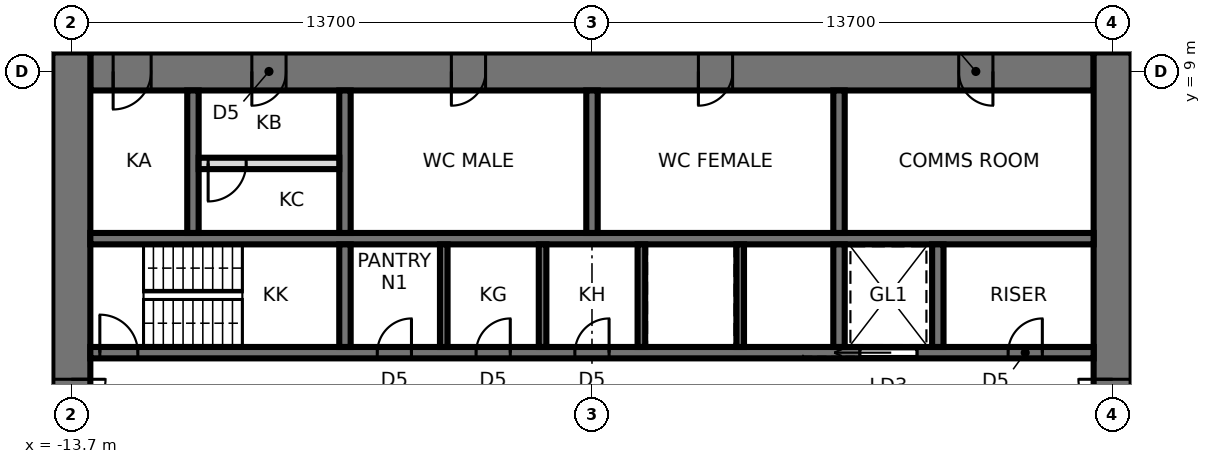
"""IFC4 building model, lengths in metres.
Left out: names, types, materials, properties, quantities, classifications, styles, units other than length and angle.
Written with IfcOpenShell. Run it as: python <this file> out.ifc"""

import sys

from ifc_helpers import new_model, si_unit, direction, frame, frame_2d, origin, place, context, subcontext, project, spatial, rectangle, extrude, element, fill, save


model = new_model("IFC4")
c1 = context("Model", 3, precision=1e-05, world=origin(), true_north=direction((0.0, 1.0)))
c2 = subcontext(c1, "Body", "Model", "MODEL_VIEW")
j1 = project(units=[si_unit("LENGTHUNIT", "METRE"), si_unit("PLANEANGLEUNIT", "RADIAN")], contexts=[c1])
p1 = place(None, origin())
s1 = spatial("IfcSite", under=j1, at=p1, CompositionType="ELEMENT")
p2 = place(p1, origin())
s2 = spatial("IfcBuilding", under=s1, at=p2, CompositionType="ELEMENT")
p3 = place(p2, frame((0.0, 0.0, 115.8)))
s3 = spatial("IfcBuildingStorey", under=s2, at=p3, CompositionType="ELEMENT", Elevation=115.8)
p4 = place(p3, frame((13.2, 9.0, 0.0), z_axis=(0.0, 0.0, 1.0), x_axis=(-1.0, 0.0, 0.0)))
e1 = element("IfcWall", 1, at=p4, inside=s3, PredefinedType="SHEAR", context=c2, shape_type="SweptSolid", body=[
    extrude(rectangle(XDim=26.4, YDim=1.0, at=frame_2d((13.2, 0.0))), origin(), (0.0, 0.0, 1.0), 3.9),
])
p5 = place(p4, frame((2.65, 0.0, 0.0)))
e2 = element("IfcOpeningElement", 2, at=p5, cuts=e1, PredefinedType="OPENING", context=c2, shape_type="SweptSolid", body=[
    extrude(rectangle(XDim=0.9, YDim=2.1, at=frame_2d((0.45, 1.05))), frame((0.0, 0.51, 0.0), z_axis=(0.0, -1.0, 0.0), x_axis=(1.0, 0.0, 0.0)), (0.0, 0.0, 1.0), 1.02),
])
p6 = place(p4, frame((9.5, 0.0, 0.0)))
e3 = element("IfcOpeningElement", 3, at=p6, cuts=e1, PredefinedType="OPENING", context=c2, shape_type="SweptSolid", body=[
    extrude(rectangle(XDim=0.9, YDim=2.1, at=frame_2d((0.45, 1.05))), frame((0.0, 0.51, 0.0), z_axis=(0.0, -1.0, 0.0), x_axis=(1.0, 0.0, 0.0)), (0.0, 0.0, 1.0), 1.02),
])
p7 = place(p4, frame((16.0, 0.0, 0.0)))
e4 = element("IfcOpeningElement", 4, at=p7, cuts=e1, PredefinedType="OPENING", context=c2, shape_type="SweptSolid", body=[
    extrude(rectangle(XDim=0.9, YDim=2.1, at=frame_2d((0.45, 1.05))), frame((0.0, 0.51, 0.0), z_axis=(0.0, -1.0, 0.0), x_axis=(1.0, 0.0, 0.0)), (0.0, 0.0, 1.0), 1.02),
])
p8 = place(p4, frame((21.25, 0.0, 0.0)))
e5 = element("IfcOpeningElement", 5, at=p8, cuts=e1, PredefinedType="OPENING", context=c2, shape_type="SweptSolid", body=[
    extrude(rectangle(XDim=0.9, YDim=2.1, at=frame_2d((0.45, 1.05))), frame((0.0, 0.51, 0.0), z_axis=(0.0, -1.0, 0.0), x_axis=(1.0, 0.0, 0.0)), (0.0, 0.0, 1.0), 1.02),
])
p9 = place(p4, frame((24.8, 0.0, 0.0)))
e6 = element("IfcOpeningElement", 6, at=p9, cuts=e1, PredefinedType="OPENING", context=c2, shape_type="SweptSolid", body=[
    extrude(rectangle(XDim=1.0, YDim=2.1, at=frame_2d((0.5, 1.05))), frame((0.0, 0.51, 0.0), z_axis=(0.0, -1.0, 0.0), x_axis=(1.0, 0.0, 0.0)), (0.0, 0.0, 1.0), 1.02),
])
p10 = place(p3, frame((13.7, -9.5, 0.0), z_axis=(0.0, 0.0, 1.0), x_axis=(0.0, 1.0, 0.0)))
e7 = element("IfcWall", 7, at=p10, inside=s3, PredefinedType="SHEAR", context=c2, shape_type="SweptSolid", body=[
    extrude(rectangle(XDim=19.0, YDim=1.0, at=frame_2d((9.5, 0.0))), origin(), (0.0, 0.0, 1.0), 3.9),
])
p11 = place(p10, frame((8.6, 0.0, 0.0)))
e8 = element("IfcOpeningElement", 8, at=p11, cuts=e7, PredefinedType="OPENING", context=c2, shape_type="SweptSolid", body=[
    extrude(rectangle(XDim=1.8, YDim=2.4, at=frame_2d((0.9, 1.2))), frame((0.0, 0.51, 0.0), z_axis=(0.0, -1.0, 0.0), x_axis=(1.0, 0.0, 0.0)), (0.0, 0.0, 1.0), 1.02),
])
p12 = place(p3, frame((-13.7, 9.5, 0.0), z_axis=(0.0, 0.0, 1.0), x_axis=(0.0, -1.0, 0.0)))
e9 = element("IfcWall", 9, at=p12, inside=s3, PredefinedType="SHEAR", context=c2, shape_type="SweptSolid", body=[
    extrude(rectangle(XDim=19.0, YDim=1.0, at=frame_2d((9.5, 0.0))), origin(), (0.0, 0.0, 1.0), 3.9),
])
p13 = place(p12, frame((8.6, 0.0, 0.0)))
e10 = element("IfcOpeningElement", 10, at=p13, cuts=e9, PredefinedType="OPENING", context=c2, shape_type="SweptSolid", body=[
    extrude(rectangle(XDim=1.8, YDim=2.4, at=frame_2d((0.9, 1.2))), frame((0.0, 0.51, 0.0), z_axis=(0.0, -1.0, 0.0), x_axis=(1.0, 0.0, 0.0)), (0.0, 0.0, 1.0), 1.02),
])
p14 = place(p3, frame((-13.2, 1.6, 0.0), z_axis=(0.0, 0.0, 1.0), x_axis=(1.0, 0.0, 0.0)))
e11 = element("IfcWall", 11, at=p14, inside=s3, PredefinedType="SHEAR", context=c2, shape_type="SweptSolid", body=[
    extrude(rectangle(XDim=26.4, YDim=0.3, at=frame_2d((13.2, 0.0))), origin(), (0.0, 0.0, 1.0), 3.9),
])
p15 = place(p14, frame((0.25, 0.0, 0.0)))
e12 = element("IfcOpeningElement", 12, at=p15, cuts=e11, PredefinedType="OPENING", context=c2, shape_type="SweptSolid", body=[
    extrude(rectangle(XDim=1.0, YDim=2.1, at=frame_2d((0.5, 1.05))), frame((0.0, 0.16, 0.0), z_axis=(0.0, -1.0, 0.0), x_axis=(1.0, 0.0, 0.0)), (0.0, 0.0, 1.0), 0.32),
])
p16 = place(p14, frame((20.25, 0.0, 0.0)))
e13 = element("IfcOpeningElement", 13, at=p16, cuts=e11, PredefinedType="OPENING", context=c2, shape_type="SweptSolid", body=[
    extrude(rectangle(XDim=1.5, YDim=2.4, at=frame_2d((0.75, 1.2))), frame((0.0, 0.16, 0.0), z_axis=(0.0, -1.0, 0.0), x_axis=(1.0, 0.0, 0.0)), (0.0, 0.0, 1.0), 0.32),
])
p17 = place(p14, frame((7.55, 0.0, 0.0)))
e14 = element("IfcOpeningElement", 14, at=p17, cuts=e11, PredefinedType="OPENING", context=c2, shape_type="SweptSolid", body=[
    extrude(rectangle(XDim=0.9, YDim=2.1, at=frame_2d((0.45, 1.05))), frame((0.0, 0.16, 0.0), z_axis=(0.0, -1.0, 0.0), x_axis=(1.0, 0.0, 0.0)), (0.0, 0.0, 1.0), 0.32),
])
p18 = place(p14, frame((10.15, 0.0, 0.0)))
e15 = element("IfcOpeningElement", 15, at=p18, cuts=e11, PredefinedType="OPENING", context=c2, shape_type="SweptSolid", body=[
    extrude(rectangle(XDim=0.9, YDim=2.1, at=frame_2d((0.45, 1.05))), frame((0.0, 0.16, 0.0), z_axis=(0.0, -1.0, 0.0), x_axis=(1.0, 0.0, 0.0)), (0.0, 0.0, 1.0), 0.32),
])
p19 = place(p14, frame((12.75, 0.0, 0.0)))
e16 = element("IfcOpeningElement", 16, at=p19, cuts=e11, PredefinedType="OPENING", context=c2, shape_type="SweptSolid", body=[
    extrude(rectangle(XDim=0.9, YDim=2.1, at=frame_2d((0.45, 1.05))), frame((0.0, 0.16, 0.0), z_axis=(0.0, -1.0, 0.0), x_axis=(1.0, 0.0, 0.0)), (0.0, 0.0, 1.0), 0.32),
])
p20 = place(p14, frame((24.15, 0.0, 0.0)))
e17 = element("IfcOpeningElement", 17, at=p20, cuts=e11, PredefinedType="OPENING", context=c2, shape_type="SweptSolid", body=[
    extrude(rectangle(XDim=0.9, YDim=2.1, at=frame_2d((0.45, 1.05))), frame((0.0, 0.16, 0.0), z_axis=(0.0, -1.0, 0.0), x_axis=(1.0, 0.0, 0.0)), (0.0, 0.0, 1.0), 0.32),
])
p21 = place(p3, frame((-13.2, 4.6, 0.0), z_axis=(0.0, 0.0, 1.0), x_axis=(1.0, 0.0, 0.0)))
e18 = element("IfcWall", 18, at=p21, inside=s3, PredefinedType="SHEAR", context=c2, shape_type="SweptSolid", body=[
    extrude(rectangle(XDim=26.4, YDim=0.3, at=frame_2d((13.2, 0.0))), origin(), (0.0, 0.0, 1.0), 3.9),
])
p22 = place(p3, frame((-6.5, 1.75, 0.0), z_axis=(0.0, 0.0, 1.0), x_axis=(0.0, 1.0, 0.0)))
e19 = element("IfcWall", 19, at=p22, inside=s3, PredefinedType="SHEAR", context=c2, shape_type="SweptSolid", body=[
    extrude(rectangle(XDim=2.7, YDim=0.3, at=frame_2d((1.35, 0.0))), origin(), (0.0, 0.0, 1.0), 3.9),
])
p23 = place(p3, frame((-6.5, 4.75, 0.0), z_axis=(0.0, 0.0, 1.0), x_axis=(0.0, 1.0, 0.0)))
e20 = element("IfcWall", 20, at=p23, inside=s3, PredefinedType="SHEAR", context=c2, shape_type="SweptSolid", body=[
    extrude(rectangle(XDim=3.75, YDim=0.3, at=frame_2d((1.875, 0.0))), origin(), (0.0, 0.0, 1.0), 3.9),
])
p24 = place(p3, frame((6.5, 1.75, 0.0), z_axis=(0.0, 0.0, 1.0), x_axis=(0.0, 1.0, 0.0)))
e21 = element("IfcWall", 21, at=p24, inside=s3, PredefinedType="SHEAR", context=c2, shape_type="SweptSolid", body=[
    extrude(rectangle(XDim=2.7, YDim=0.3, at=frame_2d((1.35, 0.0))), origin(), (0.0, 0.0, 1.0), 3.9),
])
p25 = place(p3, frame((6.5, 4.75, 0.0), z_axis=(0.0, 0.0, 1.0), x_axis=(0.0, 1.0, 0.0)))
e22 = element("IfcWall", 22, at=p25, inside=s3, PredefinedType="SHEAR", context=c2, shape_type="SweptSolid", body=[
    extrude(rectangle(XDim=3.75, YDim=0.3, at=frame_2d((1.875, 0.0))), origin(), (0.0, 0.0, 1.0), 3.9),
])
for number, where, z_axis, x_axis in (
    (23, (-3.9, 1.75, 0.0), (0.0, 0.0, 1.0), (0.0, 1.0, 0.0)),
    (24, (-1.3, 1.75, 0.0), (0.0, 0.0, 1.0), (0.0, 1.0, 0.0)),
    (25, (1.3, 1.75, 0.0), (0.0, 0.0, 1.0), (0.0, 1.0, 0.0)),
    (26, (3.9, 1.75, 0.0), (0.0, 0.0, 1.0), (0.0, 1.0, 0.0)),
):
    element("IfcWall", number, at=place(p3, frame(where, z_axis=z_axis, x_axis=x_axis)), inside=s3, PredefinedType="SHEAR", context=c2, shape_type="SweptSolid", body=[
        extrude(rectangle(XDim=2.7, YDim=0.2, at=frame_2d((1.35, 0.0))), origin(), (0.0, 0.0, 1.0), 3.9),
    ])
for number, where, z_axis, x_axis in (
    (27, (0.0, 4.75, 0.0), (0.0, 0.0, 1.0), (0.0, 1.0, 0.0)),
    (28, (-10.5, 4.75, 0.0), (0.0, 0.0, 1.0), (0.0, 1.0, 0.0)),
):
    element("IfcWall", number, at=place(p3, frame(where, z_axis=z_axis, x_axis=x_axis)), inside=s3, PredefinedType="SHEAR", context=c2, shape_type="SweptSolid", body=[
        extrude(rectangle(XDim=3.75, YDim=0.3, at=frame_2d((1.875, 0.0))), origin(), (0.0, 0.0, 1.0), 3.9),
    ])
p26 = place(p3, frame((9.1, 1.75, 0.0), z_axis=(0.0, 0.0, 1.0), x_axis=(0.0, 1.0, 0.0)))
e29 = element("IfcWall", 29, at=p26, inside=s3, PredefinedType="SHEAR", context=c2, shape_type="SweptSolid", body=[
    extrude(rectangle(XDim=2.7, YDim=0.3, at=frame_2d((1.35, 0.0))), origin(), (0.0, 0.0, 1.0), 3.9),
])
p27 = place(p3, frame((-10.35, 6.58, 0.0), z_axis=(0.0, 0.0, 1.0), x_axis=(1.0, 0.0, 0.0)))
e30 = element("IfcWall", 30, at=p27, inside=s3, PredefinedType="PARTITIONING", context=c2, shape_type="SweptSolid", body=[
    extrude(rectangle(XDim=3.7, YDim=0.3, at=frame_2d((1.85, 0.0))), origin(), (0.0, 0.0, 1.0), 3.74),
])
p28 = place(p27, frame((0.25, 0.0, 0.0)))
e31 = element("IfcOpeningElement", 31, at=p28, cuts=e30, PredefinedType="OPENING", context=c2, shape_type="SweptSolid", body=[
    extrude(rectangle(XDim=1.0, YDim=2.4, at=frame_2d((0.5, 1.2))), frame((0.0, 0.16, 0.0), z_axis=(0.0, -1.0, 0.0), x_axis=(1.0, 0.0, 0.0)), (0.0, 0.0, 1.0), 0.32),
])
p29 = place(p13, origin())
e32 = element("IfcDoor", 32, at=p29, inside=s3, OperationType="DOUBLE_DOOR_SINGLE_SWING", PredefinedType="DOOR", context=c2, shape_type="SweptSolid", body=[
    extrude(rectangle(XDim=1.72, YDim=2.36, at=frame_2d((0.9, 1.18))), frame((0.0, 0.025, 0.0), z_axis=(0.0, -1.0, 0.0), x_axis=(1.0, 0.0, 0.0)), (0.0, 0.0, 1.0), 0.05),
    extrude(rectangle(XDim=0.04, YDim=2.4, at=frame_2d((0.02, 1.2))), frame((0.0, 0.25, 0.0), z_axis=(0.0, -1.0, 0.0), x_axis=(1.0, 0.0, 0.0)), (0.0, 0.0, 1.0), 0.5),
    extrude(rectangle(XDim=0.04, YDim=2.4, at=frame_2d((1.78, 1.2))), frame((0.0, 0.25, 0.0), z_axis=(0.0, -1.0, 0.0), x_axis=(1.0, 0.0, 0.0)), (0.0, 0.0, 1.0), 0.5),
    extrude(rectangle(XDim=1.72, YDim=0.04, at=frame_2d((0.9, 2.38))), frame((0.0, 0.25, 0.0), z_axis=(0.0, -1.0, 0.0), x_axis=(1.0, 0.0, 0.0)), (0.0, 0.0, 1.0), 0.5),
])
fill(e10, e32)
p30 = place(p11, origin())
e33 = element("IfcDoor", 33, at=p30, inside=s3, OperationType="DOUBLE_DOOR_SINGLE_SWING", PredefinedType="DOOR", context=c2, shape_type="SweptSolid", body=[
    extrude(rectangle(XDim=1.72, YDim=2.36, at=frame_2d((0.9, 1.18))), frame((0.0, 0.025, 0.0), z_axis=(0.0, -1.0, 0.0), x_axis=(1.0, 0.0, 0.0)), (0.0, 0.0, 1.0), 0.05),
    extrude(rectangle(XDim=0.04, YDim=2.4, at=frame_2d((0.02, 1.2))), frame((0.0, 0.25, 0.0), z_axis=(0.0, -1.0, 0.0), x_axis=(1.0, 0.0, 0.0)), (0.0, 0.0, 1.0), 0.5),
    extrude(rectangle(XDim=0.04, YDim=2.4, at=frame_2d((1.78, 1.2))), frame((0.0, 0.25, 0.0), z_axis=(0.0, -1.0, 0.0), x_axis=(1.0, 0.0, 0.0)), (0.0, 0.0, 1.0), 0.5),
    extrude(rectangle(XDim=1.72, YDim=0.04, at=frame_2d((0.9, 2.38))), frame((0.0, 0.25, 0.0), z_axis=(0.0, -1.0, 0.0), x_axis=(1.0, 0.0, 0.0)), (0.0, 0.0, 1.0), 0.5),
])
fill(e8, e33)
p31 = place(p15, origin())
e34 = element("IfcDoor", 34, at=p31, inside=s3, OperationType="SINGLE_SWING_LEFT", PredefinedType="DOOR", context=c2, shape_type="SweptSolid", body=[
    extrude(rectangle(XDim=1.0, YDim=2.1, at=frame_2d((0.5, 1.05))), frame((0.0, 0.025, 0.0), z_axis=(0.0, -1.0, 0.0), x_axis=(1.0, 0.0, 0.0)), (0.0, 0.0, 1.0), 0.05),
])
fill(e12, e34)
p32 = place(p16, origin())
e35 = element("IfcDoor", 35, at=p32, inside=s3, OperationType="SLIDING_TO_LEFT", PredefinedType="DOOR", context=c2, shape_type="SweptSolid", body=[
    extrude(rectangle(XDim=1.5, YDim=2.4, at=frame_2d((0.75, 1.2))), frame((0.0, 0.025, 0.0), z_axis=(0.0, -1.0, 0.0), x_axis=(1.0, 0.0, 0.0)), (0.0, 0.0, 1.0), 0.05),
])
fill(e13, e35)
p33 = place(p17, origin())
e36 = element("IfcDoor", 36, at=p33, inside=s3, OperationType="SINGLE_SWING_RIGHT", PredefinedType="DOOR", context=c2, shape_type="SweptSolid", body=[
    extrude(rectangle(XDim=0.9, YDim=2.1, at=frame_2d((0.45, 1.05))), frame((0.0, 0.025, 0.0), z_axis=(0.0, -1.0, 0.0), x_axis=(1.0, 0.0, 0.0)), (0.0, 0.0, 1.0), 0.05),
])
fill(e14, e36)
p34 = place(p18, origin())
e37 = element("IfcDoor", 37, at=p34, inside=s3, OperationType="SINGLE_SWING_RIGHT", PredefinedType="DOOR", context=c2, shape_type="SweptSolid", body=[
    extrude(rectangle(XDim=0.9, YDim=2.1, at=frame_2d((0.45, 1.05))), frame((0.0, 0.025, 0.0), z_axis=(0.0, -1.0, 0.0), x_axis=(1.0, 0.0, 0.0)), (0.0, 0.0, 1.0), 0.05),
])
fill(e15, e37)
p35 = place(p19, origin())
e38 = element("IfcDoor", 38, at=p35, inside=s3, OperationType="SINGLE_SWING_RIGHT", PredefinedType="DOOR", context=c2, shape_type="SweptSolid", body=[
    extrude(rectangle(XDim=0.9, YDim=2.1, at=frame_2d((0.45, 1.05))), frame((0.0, 0.025, 0.0), z_axis=(0.0, -1.0, 0.0), x_axis=(1.0, 0.0, 0.0)), (0.0, 0.0, 1.0), 0.05),
])
fill(e16, e38)
p36 = place(p20, origin())
e39 = element("IfcDoor", 39, at=p36, inside=s3, OperationType="SINGLE_SWING_RIGHT", PredefinedType="DOOR", context=c2, shape_type="SweptSolid", body=[
    extrude(rectangle(XDim=0.9, YDim=2.1, at=frame_2d((0.45, 1.05))), frame((0.0, 0.025, 0.0), z_axis=(0.0, -1.0, 0.0), x_axis=(1.0, 0.0, 0.0)), (0.0, 0.0, 1.0), 0.05),
])
fill(e17, e39)
p37 = place(p5, origin())
e40 = element("IfcDoor", 40, at=p37, inside=s3, OperationType="SINGLE_SWING_LEFT", PredefinedType="DOOR", context=c2, shape_type="SweptSolid", body=[
    extrude(rectangle(XDim=0.82, YDim=2.06, at=frame_2d((0.45, 1.03))), frame((0.0, 0.025, 0.0), z_axis=(0.0, -1.0, 0.0), x_axis=(1.0, 0.0, 0.0)), (0.0, 0.0, 1.0), 0.05),
    extrude(rectangle(XDim=0.04, YDim=2.1, at=frame_2d((0.02, 1.05))), frame((0.0, 0.25, 0.0), z_axis=(0.0, -1.0, 0.0), x_axis=(1.0, 0.0, 0.0)), (0.0, 0.0, 1.0), 0.5),
    extrude(rectangle(XDim=0.04, YDim=2.1, at=frame_2d((0.88, 1.05))), frame((0.0, 0.25, 0.0), z_axis=(0.0, -1.0, 0.0), x_axis=(1.0, 0.0, 0.0)), (0.0, 0.0, 1.0), 0.5),
    extrude(rectangle(XDim=0.82, YDim=0.04, at=frame_2d((0.45, 2.08))), frame((0.0, 0.25, 0.0), z_axis=(0.0, -1.0, 0.0), x_axis=(1.0, 0.0, 0.0)), (0.0, 0.0, 1.0), 0.5),
])
fill(e2, e40)
p38 = place(p6, origin())
e41 = element("IfcDoor", 41, at=p38, inside=s3, OperationType="SINGLE_SWING_RIGHT", PredefinedType="DOOR", context=c2, shape_type="SweptSolid", body=[
    extrude(rectangle(XDim=0.82, YDim=2.06, at=frame_2d((0.45, 1.03))), frame((0.0, 0.025, 0.0), z_axis=(0.0, -1.0, 0.0), x_axis=(1.0, 0.0, 0.0)), (0.0, 0.0, 1.0), 0.05),
    extrude(rectangle(XDim=0.04, YDim=2.1, at=frame_2d((0.02, 1.05))), frame((0.0, 0.25, 0.0), z_axis=(0.0, -1.0, 0.0), x_axis=(1.0, 0.0, 0.0)), (0.0, 0.0, 1.0), 0.5),
    extrude(rectangle(XDim=0.04, YDim=2.1, at=frame_2d((0.88, 1.05))), frame((0.0, 0.25, 0.0), z_axis=(0.0, -1.0, 0.0), x_axis=(1.0, 0.0, 0.0)), (0.0, 0.0, 1.0), 0.5),
    extrude(rectangle(XDim=0.82, YDim=0.04, at=frame_2d((0.45, 2.08))), frame((0.0, 0.25, 0.0), z_axis=(0.0, -1.0, 0.0), x_axis=(1.0, 0.0, 0.0)), (0.0, 0.0, 1.0), 0.5),
])
fill(e3, e41)
p39 = place(p7, origin())
e42 = element("IfcDoor", 42, at=p39, inside=s3, OperationType="SINGLE_SWING_RIGHT", PredefinedType="DOOR", context=c2, shape_type="SweptSolid", body=[
    extrude(rectangle(XDim=0.82, YDim=2.06, at=frame_2d((0.45, 1.03))), frame((0.0, 0.025, 0.0), z_axis=(0.0, -1.0, 0.0), x_axis=(1.0, 0.0, 0.0)), (0.0, 0.0, 1.0), 0.05),
    extrude(rectangle(XDim=0.04, YDim=2.1, at=frame_2d((0.02, 1.05))), frame((0.0, 0.25, 0.0), z_axis=(0.0, -1.0, 0.0), x_axis=(1.0, 0.0, 0.0)), (0.0, 0.0, 1.0), 0.5),
    extrude(rectangle(XDim=0.04, YDim=2.1, at=frame_2d((0.88, 1.05))), frame((0.0, 0.25, 0.0), z_axis=(0.0, -1.0, 0.0), x_axis=(1.0, 0.0, 0.0)), (0.0, 0.0, 1.0), 0.5),
    extrude(rectangle(XDim=0.82, YDim=0.04, at=frame_2d((0.45, 2.08))), frame((0.0, 0.25, 0.0), z_axis=(0.0, -1.0, 0.0), x_axis=(1.0, 0.0, 0.0)), (0.0, 0.0, 1.0), 0.5),
])
fill(e4, e42)
p40 = place(p8, origin())
e43 = element("IfcDoor", 43, at=p40, inside=s3, OperationType="SINGLE_SWING_RIGHT", PredefinedType="DOOR", context=c2, shape_type="SweptSolid", body=[
    extrude(rectangle(XDim=0.82, YDim=2.06, at=frame_2d((0.45, 1.03))), frame((0.0, 0.025, 0.0), z_axis=(0.0, -1.0, 0.0), x_axis=(1.0, 0.0, 0.0)), (0.0, 0.0, 1.0), 0.05),
    extrude(rectangle(XDim=0.04, YDim=2.1, at=frame_2d((0.02, 1.05))), frame((0.0, 0.25, 0.0), z_axis=(0.0, -1.0, 0.0), x_axis=(1.0, 0.0, 0.0)), (0.0, 0.0, 1.0), 0.5),
    extrude(rectangle(XDim=0.04, YDim=2.1, at=frame_2d((0.88, 1.05))), frame((0.0, 0.25, 0.0), z_axis=(0.0, -1.0, 0.0), x_axis=(1.0, 0.0, 0.0)), (0.0, 0.0, 1.0), 0.5),
    extrude(rectangle(XDim=0.82, YDim=0.04, at=frame_2d((0.45, 2.08))), frame((0.0, 0.25, 0.0), z_axis=(0.0, -1.0, 0.0), x_axis=(1.0, 0.0, 0.0)), (0.0, 0.0, 1.0), 0.5),
])
fill(e5, e43)
p41 = place(p9, origin())
e44 = element("IfcDoor", 44, at=p41, inside=s3, OperationType="SINGLE_SWING_RIGHT", PredefinedType="DOOR", context=c2, shape_type="SweptSolid", body=[
    extrude(rectangle(XDim=0.92, YDim=2.06, at=frame_2d((0.5, 1.03))), frame((0.0, 0.025, 0.0), z_axis=(0.0, -1.0, 0.0), x_axis=(1.0, 0.0, 0.0)), (0.0, 0.0, 1.0), 0.05),
    extrude(rectangle(XDim=0.04, YDim=2.1, at=frame_2d((0.02, 1.05))), frame((0.0, 0.25, 0.0), z_axis=(0.0, -1.0, 0.0), x_axis=(1.0, 0.0, 0.0)), (0.0, 0.0, 1.0), 0.5),
    extrude(rectangle(XDim=0.04, YDim=2.1, at=frame_2d((0.98, 1.05))), frame((0.0, 0.25, 0.0), z_axis=(0.0, -1.0, 0.0), x_axis=(1.0, 0.0, 0.0)), (0.0, 0.0, 1.0), 0.5),
    extrude(rectangle(XDim=0.92, YDim=0.04, at=frame_2d((0.5, 2.08))), frame((0.0, 0.25, 0.0), z_axis=(0.0, -1.0, 0.0), x_axis=(1.0, 0.0, 0.0)), (0.0, 0.0, 1.0), 0.5),
])
fill(e6, e44)
p42 = place(p28, frame((1.0, 0.0, 0.0), z_axis=(0.0, 0.0, 1.0), x_axis=(-1.0, 0.0, 0.0)))
e45 = element("IfcDoor", 45, at=p42, inside=s3, OperationType="SINGLE_SWING_RIGHT", PredefinedType="DOOR", context=c2, shape_type="SweptSolid", body=[
    extrude(rectangle(XDim=1.0, YDim=2.4, at=frame_2d((0.5, 1.2))), frame((0.0, 0.025, 0.0), z_axis=(0.0, -1.0, 0.0), x_axis=(1.0, 0.0, 0.0)), (0.0, 0.0, 1.0), 0.05),
])
fill(e31, e45)
save(model, sys.argv[1])
